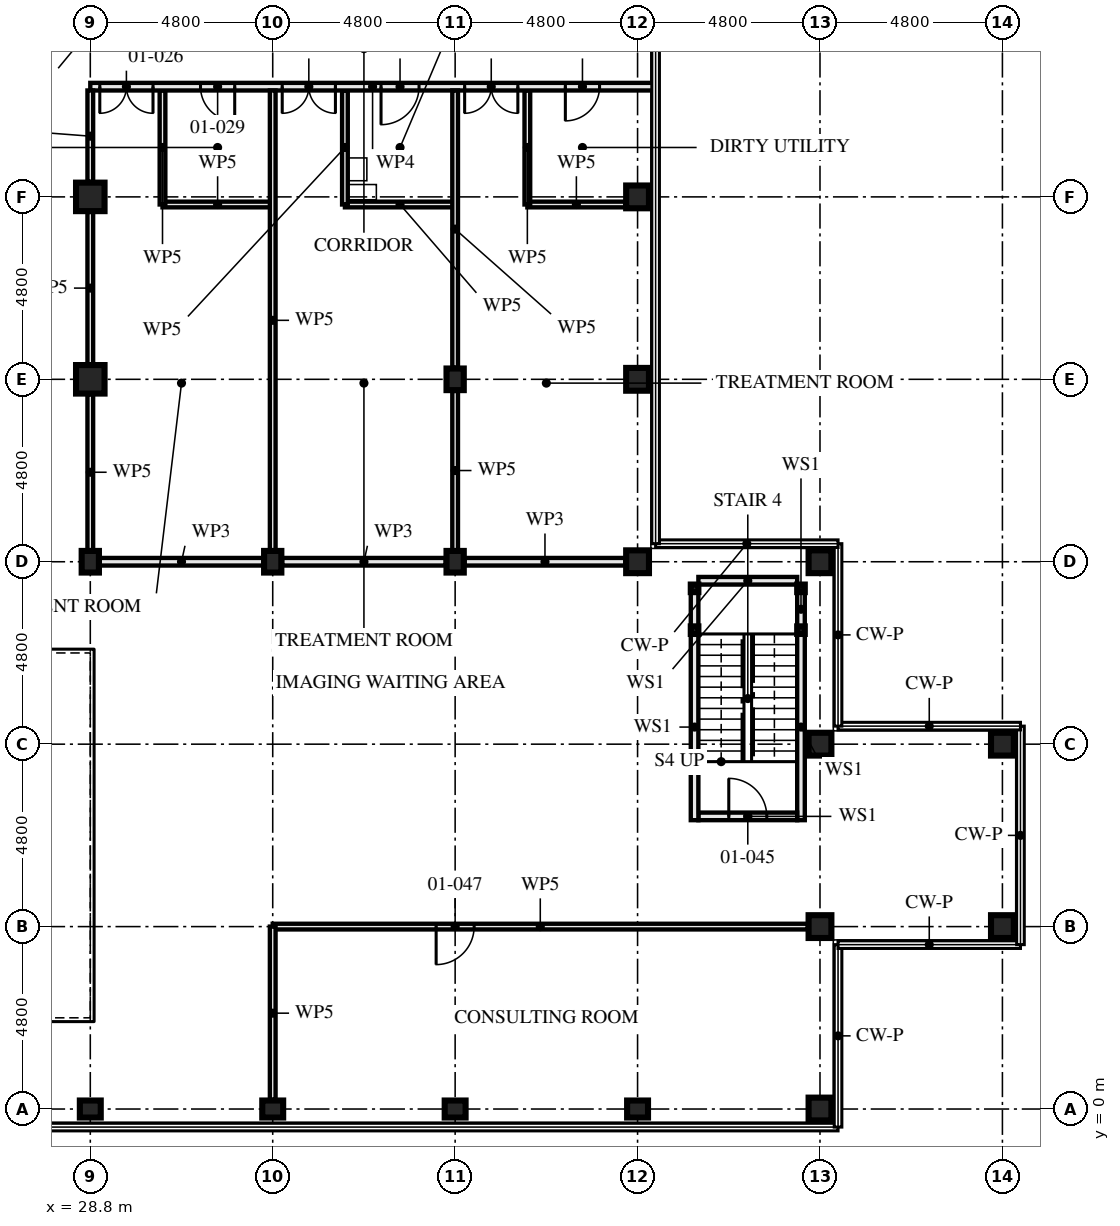
"""IFC4 building model, lengths in metres.
Left out: names, types, materials, properties, quantities, classifications, styles, units other than length and angle.
Written with IfcOpenShell. Run it as: python <this file> out.ifc"""

import sys

from ifc_helpers import new_model, si_unit, direction, frame, frame_2d, origin, origin_2d, place, context, subcontext, project, spatial, rectangle, hollow_rectangle, i_section, extrude, element, fill, save


model = new_model("IFC4")
c1 = context("Model", 3, precision=1e-05, world=origin(), true_north=direction((0.0, 1.0)))
c2 = subcontext(c1, "Body", "Model", "MODEL_VIEW")
j1 = project(units=[si_unit("LENGTHUNIT", "METRE"), si_unit("PLANEANGLEUNIT", "RADIAN")], contexts=[c1])
p1 = place(None, origin())
s1 = spatial("IfcSite", under=j1, at=p1, CompositionType="ELEMENT")
p2 = place(p1, origin())
s2 = spatial("IfcBuilding", under=s1, at=p2, CompositionType="ELEMENT")
p3 = place(p2, frame((0.0, 0.0, 4.5)))
s3 = spatial("IfcBuildingStorey", under=s2, at=p3, CompositionType="ELEMENT", Elevation=4.5)
p4 = place(p3, frame((28.8, 0.0, 0.0), z_axis=(0.0, 0.0, 1.0), x_axis=(0.0, 1.0, 0.0)))
e1 = element("IfcColumn", 1, at=p4, inside=s3, PredefinedType="COLUMN", context=c2, shape_type="SweptSolid", body=[
    extrude(i_section(OverallWidth=0.448, OverallDepth=0.55, WebThickness=0.072, FlangeThickness=0.115, FilletRadius=0.015, at=origin_2d()), origin(), (0.0, 0.0, 1.0), 4.5),
])
p5 = place(p3, frame((28.8, 14.4, 0.0), z_axis=(0.0, 0.0, 1.0), x_axis=(1.0, 0.0, 0.0)))
e2 = element("IfcColumn", 2, at=p5, inside=s3, PredefinedType="COLUMN", context=c2, shape_type="SweptSolid", body=[
    extrude(i_section(OverallWidth=0.454, OverallDepth=0.569, WebThickness=0.078, FlangeThickness=0.125, FilletRadius=0.015, at=origin_2d()), origin(), (0.0, 0.0, 1.0), 4.5),
])
for number, where, z_axis, x_axis in (
    (3, (28.8, 19.2, 0.0), (0.0, 0.0, 1.0), (1.0, 0.0, 0.0)),
    (4, (28.8, 24.0, 0.0), (0.0, 0.0, 1.0), (1.0, 0.0, 0.0)),
):
    element("IfcColumn", number, at=place(p3, frame(where, z_axis=z_axis, x_axis=x_axis)), inside=s3, PredefinedType="COLUMN", context=c2, shape_type="SweptSolid", body=[
        extrude(hollow_rectangle(XDim=0.75, YDim=0.75, WallThickness=0.08, at=origin_2d()), origin(), (0.0, 0.0, 1.0), 4.5),
    ])
p6 = place(p3, frame((33.6, 0.0, 0.0), z_axis=(0.0, 0.0, 1.0), x_axis=(0.0, 1.0, 0.0)))
e5 = element("IfcColumn", 5, at=p6, inside=s3, PredefinedType="COLUMN", context=c2, shape_type="SweptSolid", body=[
    extrude(i_section(OverallWidth=0.448, OverallDepth=0.55, WebThickness=0.072, FlangeThickness=0.115, FilletRadius=0.015, at=origin_2d()), origin(), (0.0, 0.0, 1.0), 4.5),
])
p7 = place(p3, frame((33.6, 14.4, 0.0), z_axis=(0.0, 0.0, 1.0), x_axis=(1.0, 0.0, 0.0)))
e6 = element("IfcColumn", 6, at=p7, inside=s3, PredefinedType="COLUMN", context=c2, shape_type="SweptSolid", body=[
    extrude(i_section(OverallWidth=0.454, OverallDepth=0.569, WebThickness=0.078, FlangeThickness=0.125, FilletRadius=0.015, at=origin_2d()), origin(), (0.0, 0.0, 1.0), 4.5),
])
p8 = place(p3, frame((38.4, 0.0, 0.0), z_axis=(0.0, 0.0, 1.0), x_axis=(0.0, 1.0, 0.0)))
e7 = element("IfcColumn", 7, at=p8, inside=s3, PredefinedType="COLUMN", context=c2, shape_type="SweptSolid", body=[
    extrude(i_section(OverallWidth=0.448, OverallDepth=0.55, WebThickness=0.072, FlangeThickness=0.115, FilletRadius=0.015, at=origin_2d()), origin(), (0.0, 0.0, 1.0), 4.5),
])
for number, where, z_axis, x_axis in (
    (8, (38.4, 14.4, 0.0), (0.0, 0.0, 1.0), (1.0, 0.0, 0.0)),
    (9, (38.4, 19.2, 0.0), (0.0, 0.0, 1.0), (1.0, 0.0, 0.0)),
):
    element("IfcColumn", number, at=place(p3, frame(where, z_axis=z_axis, x_axis=x_axis)), inside=s3, PredefinedType="COLUMN", context=c2, shape_type="SweptSolid", body=[
        extrude(i_section(OverallWidth=0.454, OverallDepth=0.569, WebThickness=0.078, FlangeThickness=0.125, FilletRadius=0.015, at=origin_2d()), origin(), (0.0, 0.0, 1.0), 4.5),
    ])
p9 = place(p3, frame((43.2, 0.0, 0.0), z_axis=(0.0, 0.0, 1.0), x_axis=(0.0, 1.0, 0.0)))
e10 = element("IfcColumn", 10, at=p9, inside=s3, PredefinedType="COLUMN", context=c2, shape_type="SweptSolid", body=[
    extrude(i_section(OverallWidth=0.448, OverallDepth=0.55, WebThickness=0.072, FlangeThickness=0.115, FilletRadius=0.015, at=origin_2d()), origin(), (0.0, 0.0, 1.0), 4.5),
])
p10 = place(p3, frame((43.2, 14.4, 0.0), z_axis=(0.0, 0.0, 1.0), x_axis=(0.0, 1.0, 0.0)))
e11 = element("IfcColumn", 11, at=p10, inside=s3, PredefinedType="COLUMN", context=c2, shape_type="SweptSolid", body=[
    extrude(hollow_rectangle(XDim=0.6, YDim=0.6, WallThickness=0.05, at=origin_2d()), origin(), (0.0, 0.0, 1.0), 4.5),
])
for number, where, z_axis, x_axis in (
    (12, (43.2, 19.2, 0.0), (0.0, 0.0, 1.0), (1.0, 0.0, 0.0)),
    (13, (43.2, 24.0, 0.0), (0.0, 0.0, 1.0), (1.0, 0.0, 0.0)),
):
    element("IfcColumn", number, at=place(p3, frame(where, z_axis=z_axis, x_axis=x_axis)), inside=s3, PredefinedType="COLUMN", context=c2, shape_type="SweptSolid", body=[
        extrude(hollow_rectangle(XDim=0.6, YDim=0.6, WallThickness=0.08, at=origin_2d()), origin(), (0.0, 0.0, 1.0), 4.5),
    ])
for number, where, z_axis, x_axis in (
    (14, (48.0, 0.0, 0.0), (0.0, 0.0, 1.0), (0.0, 1.0, 0.0)),
    (15, (48.0, 4.8, 0.0), (0.0, 0.0, 1.0), (0.0, 1.0, 0.0)),
    (16, (48.0, 9.6, 0.0), (0.0, 0.0, 1.0), (0.0, 1.0, 0.0)),
    (17, (48.0, 14.4, 0.0), (0.0, 0.0, 1.0), (0.0, 1.0, 0.0)),
    (18, (52.8, 4.8, 0.0), (0.0, 0.0, 1.0), (0.0, 1.0, 0.0)),
    (19, (52.8, 9.6, 0.0), (0.0, 0.0, 1.0), (0.0, 1.0, 0.0)),
):
    element("IfcColumn", number, at=place(p3, frame(where, z_axis=z_axis, x_axis=x_axis)), inside=s3, PredefinedType="COLUMN", context=c2, shape_type="SweptSolid", body=[
        extrude(hollow_rectangle(XDim=0.6, YDim=0.6, WallThickness=0.05, at=origin_2d()), origin(), (0.0, 0.0, 1.0), 4.5),
    ])
for number, where, z_axis, x_axis in (
    (20, (44.7, 13.7, 0.0), (0.0, 0.0, 1.0), (1.0, 0.0, 0.0)),
    (21, (47.5, 13.7, 0.0), (0.0, 0.0, 1.0), (1.0, 0.0, 0.0)),
    (22, (44.7, 12.6, 0.0), (0.0, 0.0, 1.0), (1.0, 0.0, 0.0)),
    (23, (47.5, 12.6, 0.0), (0.0, 0.0, 1.0), (1.0, 0.0, 0.0)),
):
    element("IfcColumn", number, at=place(p3, frame(where, z_axis=z_axis, x_axis=x_axis)), inside=s3, PredefinedType="COLUMN", context=c2, shape_type="SweptSolid", body=[
        extrude(hollow_rectangle(XDim=0.2, YDim=0.2, WallThickness=0.008, at=origin_2d()), origin(), (0.0, 0.0, 1.0), 4.33),
    ])
p11 = place(p3, frame((30.7, 23.8, 0.0), z_axis=(0.0, 0.0, 1.0), x_axis=(0.0, 1.0, 0.0)))
e24 = element("IfcWall", 24, at=p11, inside=s3, PredefinedType="PARTITIONING", context=c2, shape_type="SweptSolid", body=[
    extrude(rectangle(XDim=3.0, YDim=0.15, at=frame_2d((1.5, 0.0))), origin(), (0.0, 0.0, 1.0), 3.55),
])
p12 = place(p3, frame((30.7, 23.8, 0.0), z_axis=(0.0, 0.0, 1.0), x_axis=(1.0, 0.0, 0.0)))
e25 = element("IfcWall", 25, at=p12, inside=s3, PredefinedType="PARTITIONING", context=c2, shape_type="SweptSolid", body=[
    extrude(rectangle(XDim=2.9, YDim=0.15, at=frame_2d((1.45, 0.0))), origin(), (0.0, 0.0, 1.0), 4.33),
])
p13 = place(p3, frame((35.5, 23.8, 0.0), z_axis=(0.0, 0.0, 1.0), x_axis=(0.0, 1.0, 0.0)))
e26 = element("IfcWall", 26, at=p13, inside=s3, PredefinedType="PARTITIONING", context=c2, shape_type="SweptSolid", body=[
    extrude(rectangle(XDim=3.0, YDim=0.15, at=frame_2d((1.5, 0.0))), origin(), (0.0, 0.0, 1.0), 3.55),
])
p14 = place(p3, frame((35.5, 23.8, 0.0), z_axis=(0.0, 0.0, 1.0), x_axis=(1.0, 0.0, 0.0)))
e27 = element("IfcWall", 27, at=p14, inside=s3, PredefinedType="PARTITIONING", context=c2, shape_type="SweptSolid", body=[
    extrude(rectangle(XDim=2.9, YDim=0.15, at=frame_2d((1.45, 0.0))), origin(), (0.0, 0.0, 1.0), 4.33),
])
p15 = place(p3, frame((40.3, 23.8, 0.0), z_axis=(0.0, 0.0, 1.0), x_axis=(0.0, 1.0, 0.0)))
e28 = element("IfcWall", 28, at=p15, inside=s3, PredefinedType="PARTITIONING", context=c2, shape_type="SweptSolid", body=[
    extrude(rectangle(XDim=3.0, YDim=0.15, at=frame_2d((1.5, 0.0))), origin(), (0.0, 0.0, 1.0), 3.55),
])
p16 = place(p3, frame((40.3, 23.8, 0.0), z_axis=(0.0, 0.0, 1.0), x_axis=(1.0, 0.0, 0.0)))
e29 = element("IfcWall", 29, at=p16, inside=s3, PredefinedType="PARTITIONING", context=c2, shape_type="SweptSolid", body=[
    extrude(rectangle(XDim=2.58, YDim=0.15, at=frame_2d((1.29, 0.0))), origin(), (0.0, 0.0, 1.0), 4.33),
])
p17 = place(p3, frame((33.6, 14.705, 0.0), z_axis=(0.0, 0.0, 1.0), x_axis=(0.0, 1.0, 0.0)))
e30 = element("IfcWall", 30, at=p17, inside=s3, PredefinedType="PARTITIONING", context=c2, shape_type="SweptSolid", body=[
    extrude(rectangle(XDim=12.095, YDim=0.15, at=frame_2d((6.048, 0.0))), origin(), (0.0, 0.0, 1.0), 3.55),
])
p18 = place(p3, frame((38.4, 14.705, 0.0), z_axis=(0.0, 0.0, 1.0), x_axis=(0.0, 1.0, 0.0)))
e31 = element("IfcWall", 31, at=p18, inside=s3, PredefinedType="PARTITIONING", context=c2, shape_type="SweptSolid", body=[
    extrude(rectangle(XDim=4.191, YDim=0.15, at=frame_2d((2.095, 0.0))), origin(), (0.0, 0.0, 1.0), 3.55),
])
p19 = place(p3, frame((38.4, 19.504, 0.0), z_axis=(0.0, 0.0, 1.0), x_axis=(0.0, 1.0, 0.0)))
e32 = element("IfcWall", 32, at=p19, inside=s3, PredefinedType="PARTITIONING", context=c2, shape_type="SweptSolid", body=[
    extrude(rectangle(XDim=7.296, YDim=0.15, at=frame_2d((3.648, 0.0))), origin(), (0.0, 0.0, 1.0), 3.55),
])
p20 = place(p3, frame((28.8, 26.9, 0.0), z_axis=(0.0, 0.0, 1.0), x_axis=(1.0, 0.0, 0.0)))
e33 = element("IfcWall", 33, at=p20, inside=s3, PredefinedType="PARTITIONING", context=c2, shape_type="SweptSolid", body=[
    extrude(rectangle(XDim=14.855, YDim=0.2, at=frame_2d((7.427, 0.0))), origin(), (0.0, 0.0, 1.0), 3.32),
])
p21 = place(p20, frame((0.25, 0.0, 0.0)))
e34 = element("IfcOpeningElement", 34, at=p21, cuts=e33, PredefinedType="OPENING", context=c2, shape_type="SweptSolid", body=[
    extrude(rectangle(XDim=1.4, YDim=2.4, at=frame_2d((0.7, 1.2))), frame((0.0, 0.111, 0.0), z_axis=(0.0, -1.0, 0.0), x_axis=(1.0, 0.0, 0.0)), (0.0, 0.0, 1.0), 0.221),
])
p22 = place(p20, frame((5.05, 0.0, 0.0)))
e35 = element("IfcOpeningElement", 35, at=p22, cuts=e33, PredefinedType="OPENING", context=c2, shape_type="SweptSolid", body=[
    extrude(rectangle(XDim=1.4, YDim=2.4, at=frame_2d((0.7, 1.2))), frame((0.0, 0.111, 0.0), z_axis=(0.0, -1.0, 0.0), x_axis=(1.0, 0.0, 0.0)), (0.0, 0.0, 1.0), 0.221),
])
p23 = place(p20, frame((9.85, 0.0, 0.0)))
e36 = element("IfcOpeningElement", 36, at=p23, cuts=e33, PredefinedType="OPENING", context=c2, shape_type="SweptSolid", body=[
    extrude(rectangle(XDim=1.4, YDim=2.4, at=frame_2d((0.7, 1.2))), frame((0.0, 0.111, 0.0), z_axis=(0.0, -1.0, 0.0), x_axis=(1.0, 0.0, 0.0)), (0.0, 0.0, 1.0), 0.221),
])
p24 = place(p20, frame((2.9, 0.0, 0.0)))
e37 = element("IfcOpeningElement", 37, at=p24, cuts=e33, PredefinedType="OPENING", context=c2, shape_type="SweptSolid", body=[
    extrude(rectangle(XDim=0.9, YDim=2.1, at=frame_2d((0.45, 1.05))), frame((0.0, 0.111, 0.0), z_axis=(0.0, -1.0, 0.0), x_axis=(1.0, 0.0, 0.0)), (0.0, 0.0, 1.0), 0.221),
])
p25 = place(p20, frame((7.65, 0.0, 0.0)))
e38 = element("IfcOpeningElement", 38, at=p25, cuts=e33, PredefinedType="OPENING", context=c2, shape_type="SweptSolid", body=[
    extrude(rectangle(XDim=1.0, YDim=2.1, at=frame_2d((0.5, 1.05))), frame((0.0, 0.111, 0.0), z_axis=(0.0, -1.0, 0.0), x_axis=(1.0, 0.0, 0.0)), (0.0, 0.0, 1.0), 0.221),
])
p26 = place(p20, frame((12.5, 0.0, 0.0)))
e39 = element("IfcOpeningElement", 39, at=p26, cuts=e33, PredefinedType="OPENING", context=c2, shape_type="SweptSolid", body=[
    extrude(rectangle(XDim=0.9, YDim=2.1, at=frame_2d((0.45, 1.05))), frame((0.0, 0.111, 0.0), z_axis=(0.0, -1.0, 0.0), x_axis=(1.0, 0.0, 0.0)), (0.0, 0.0, 1.0), 0.221),
])
p27 = place(p3, frame((44.7, 13.6, 0.0), z_axis=(0.0, 0.0, 1.0), x_axis=(0.0, -1.0, 0.0)))
e40 = element("IfcWall", 40, at=p27, inside=s3, PredefinedType="SOLIDWALL", context=c2, shape_type="SweptSolid", body=[
    extrude(rectangle(XDim=0.9, YDim=0.2, at=frame_2d((0.45, 0.0))), origin(), (0.0, 0.0, 1.0), 3.99),
])
p28 = place(p3, frame((44.7, 12.5, 0.0), z_axis=(0.0, 0.0, 1.0), x_axis=(0.0, -1.0, 0.0)))
e41 = element("IfcWall", 41, at=p28, inside=s3, PredefinedType="SOLIDWALL", context=c2, shape_type="SweptSolid", body=[
    extrude(rectangle(XDim=4.9, YDim=0.2, at=frame_2d((2.45, 0.0))), origin(), (0.0, 0.0, 1.0), 3.99),
])
p29 = place(p3, frame((47.5, 13.6, 0.0), z_axis=(0.0, 0.0, 1.0), x_axis=(0.0, -1.0, 0.0)))
e42 = element("IfcWall", 42, at=p29, inside=s3, PredefinedType="SOLIDWALL", context=c2, shape_type="SweptSolid", body=[
    extrude(rectangle(XDim=0.9, YDim=0.2, at=frame_2d((0.45, 0.0))), origin(), (0.0, 0.0, 1.0), 3.99),
])
p30 = place(p3, frame((47.5, 12.5, 0.0), z_axis=(0.0, 0.0, 1.0), x_axis=(0.0, -1.0, 0.0)))
e43 = element("IfcWall", 43, at=p30, inside=s3, PredefinedType="SOLIDWALL", context=c2, shape_type="SweptSolid", body=[
    extrude(rectangle(XDim=4.9, YDim=0.2, at=frame_2d((2.45, 0.0))), origin(), (0.0, 0.0, 1.0), 3.99),
])
p31 = place(p3, frame((44.8, 13.9, 0.0), z_axis=(0.0, 0.0, 1.0), x_axis=(1.0, 0.0, 0.0)))
e44 = element("IfcWall", 44, at=p31, inside=s3, PredefinedType="SOLIDWALL", context=c2, shape_type="SweptSolid", body=[
    extrude(rectangle(XDim=2.6, YDim=0.2, at=frame_2d((1.3, 0.0))), origin(), (0.0, 0.0, 1.0), 4.33),
])
p32 = place(p3, frame((44.8, 7.7, 0.0), z_axis=(0.0, 0.0, 1.0), x_axis=(1.0, 0.0, 0.0)))
e45 = element("IfcWall", 45, at=p32, inside=s3, PredefinedType="SOLIDWALL", context=c2, shape_type="SweptSolid", body=[
    extrude(rectangle(XDim=2.6, YDim=0.2, at=frame_2d((1.3, 0.0))), origin(), (0.0, 0.0, 1.0), 4.33),
])
p33 = place(p32, frame((0.8, 0.0, 0.0)))
e46 = element("IfcOpeningElement", 46, at=p33, cuts=e45, PredefinedType="OPENING", context=c2, shape_type="SweptSolid", body=[
    extrude(rectangle(XDim=1.0, YDim=2.1, at=frame_2d((0.5, 1.05))), frame((0.0, 0.111, 0.0), z_axis=(0.0, -1.0, 0.0), x_axis=(1.0, 0.0, 0.0)), (0.0, 0.0, 1.0), 0.221),
])
p34 = place(p3, frame((33.6, 4.8, 0.0), z_axis=(0.0, 0.0, 1.0), x_axis=(1.0, 0.0, 0.0)))
e47 = element("IfcWall", 47, at=p34, inside=s3, PredefinedType="PARTITIONING", context=c2, shape_type="SweptSolid", body=[
    extrude(rectangle(XDim=14.08, YDim=0.15, at=frame_2d((7.04, 0.0))), origin(), (0.0, 0.0, 1.0), 3.55),
])
p35 = place(p34, frame((4.3, 0.0, 0.0)))
e48 = element("IfcOpeningElement", 48, at=p35, cuts=e47, PredefinedType="OPENING", context=c2, shape_type="SweptSolid", body=[
    extrude(rectangle(XDim=1.0, YDim=2.4, at=frame_2d((0.5, 1.2))), frame((0.0, 0.085, 0.0), z_axis=(0.0, -1.0, 0.0), x_axis=(1.0, 0.0, 0.0)), (0.0, 0.0, 1.0), 0.171),
])
p36 = place(p3, frame((33.6, 0.244, 0.0), z_axis=(0.0, 0.0, 1.0), x_axis=(0.0, 1.0, 0.0)))
e49 = element("IfcWall", 49, at=p36, inside=s3, PredefinedType="PARTITIONING", context=c2, shape_type="SweptSolid", body=[
    extrude(rectangle(XDim=4.556, YDim=0.15, at=frame_2d((2.278, 0.0))), origin(), (0.0, 0.0, 1.0), 3.55),
])
p37 = place(p3, frame((29.047, 14.4, 0.0), z_axis=(0.0, 0.0, 1.0), x_axis=(1.0, 0.0, 0.0)))
e50 = element("IfcWall", 50, at=p37, inside=s3, PredefinedType="PARTITIONING", context=c2, shape_type="SweptSolid", body=[
    extrude(rectangle(XDim=4.306, YDim=0.2, at=frame_2d((2.153, 0.0))), origin(), (0.0, 0.0, 1.0), 3.32),
])
p38 = place(p3, frame((33.847, 14.4, 0.0), z_axis=(0.0, 0.0, 1.0), x_axis=(1.0, 0.0, 0.0)))
e51 = element("IfcWall", 51, at=p38, inside=s3, PredefinedType="PARTITIONING", context=c2, shape_type="SweptSolid", body=[
    extrude(rectangle(XDim=4.306, YDim=0.2, at=frame_2d((2.153, 0.0))), origin(), (0.0, 0.0, 1.0), 3.32),
])
p39 = place(p3, frame((38.647, 14.4, 0.0), z_axis=(0.0, 0.0, 1.0), x_axis=(1.0, 0.0, 0.0)))
e52 = element("IfcWall", 52, at=p39, inside=s3, PredefinedType="PARTITIONING", context=c2, shape_type="SweptSolid", body=[
    extrude(rectangle(XDim=4.233, YDim=0.2, at=frame_2d((2.116, 0.0))), origin(), (0.0, 0.0, 1.0), 3.32),
])
p40 = place(p3, frame((28.8, 14.705, 0.0), z_axis=(0.0, 0.0, 1.0), x_axis=(0.0, 1.0, 0.0)))
e53 = element("IfcWall", 53, at=p40, inside=s3, PredefinedType="PARTITIONING", context=c2, shape_type="SweptSolid", body=[
    extrude(rectangle(XDim=4.1, YDim=0.15, at=frame_2d((2.05, 0.0))), origin(), (0.0, 0.0, 1.0), 3.32),
])
p41 = place(p3, frame((28.8, 19.595, 0.0), z_axis=(0.0, 0.0, 1.0), x_axis=(0.0, 1.0, 0.0)))
e54 = element("IfcWall", 54, at=p41, inside=s3, PredefinedType="PARTITIONING", context=c2, shape_type="SweptSolid", body=[
    extrude(rectangle(XDim=4.01, YDim=0.15, at=frame_2d((2.005, 0.0))), origin(), (0.0, 0.0, 1.0), 3.32),
])
p42 = place(p3, frame((28.8, 24.395, 0.0), z_axis=(0.0, 0.0, 1.0), x_axis=(0.0, 1.0, 0.0)))
e55 = element("IfcWall", 55, at=p42, inside=s3, PredefinedType="PARTITIONING", context=c2, shape_type="SweptSolid", body=[
    extrude(rectangle(XDim=2.405, YDim=0.15, at=frame_2d((1.203, 0.0))), origin(), (0.0, 0.0, 1.0), 3.32),
])
p43 = place(p21, frame((1.4, 0.0, 0.0), z_axis=(0.0, 0.0, 1.0), x_axis=(-1.0, 0.0, 0.0)))
e56 = element("IfcDoor", 56, at=p43, inside=s3, OperationType="DOUBLE_DOOR_SINGLE_SWING", PredefinedType="DOOR", context=c2, shape_type="SweptSolid", body=[
    extrude(rectangle(XDim=1.4, YDim=2.4, at=frame_2d((0.7, 1.2))), frame((0.0, 0.027, 0.0), z_axis=(0.0, -1.0, 0.0), x_axis=(1.0, 0.0, 0.0)), (0.0, 0.0, 1.0), 0.054),
])
fill(e34, e56)
p44 = place(p22, frame((1.4, 0.0, 0.0), z_axis=(0.0, 0.0, 1.0), x_axis=(-1.0, 0.0, 0.0)))
e57 = element("IfcDoor", 57, at=p44, inside=s3, OperationType="DOUBLE_DOOR_SINGLE_SWING", PredefinedType="DOOR", context=c2, shape_type="SweptSolid", body=[
    extrude(rectangle(XDim=1.4, YDim=2.4, at=frame_2d((0.7, 1.2))), frame((0.0, 0.027, 0.0), z_axis=(0.0, -1.0, 0.0), x_axis=(1.0, 0.0, 0.0)), (0.0, 0.0, 1.0), 0.054),
])
fill(e35, e57)
p45 = place(p23, frame((1.4, 0.0, 0.0), z_axis=(0.0, 0.0, 1.0), x_axis=(-1.0, 0.0, 0.0)))
e58 = element("IfcDoor", 58, at=p45, inside=s3, OperationType="DOUBLE_DOOR_SINGLE_SWING", PredefinedType="DOOR", context=c2, shape_type="SweptSolid", body=[
    extrude(rectangle(XDim=1.4, YDim=2.4, at=frame_2d((0.7, 1.2))), frame((0.0, 0.027, 0.0), z_axis=(0.0, -1.0, 0.0), x_axis=(1.0, 0.0, 0.0)), (0.0, 0.0, 1.0), 0.054),
])
fill(e36, e58)
p46 = place(p24, frame((0.9, 0.0, 0.0), z_axis=(0.0, 0.0, 1.0), x_axis=(-1.0, 0.0, 0.0)))
e59 = element("IfcDoor", 59, at=p46, inside=s3, OperationType="SINGLE_SWING_RIGHT", PredefinedType="DOOR", context=c2, shape_type="SweptSolid", body=[
    extrude(rectangle(XDim=0.9, YDim=2.1, at=frame_2d((0.45, 1.05))), frame((0.0, 0.027, 0.0), z_axis=(0.0, -1.0, 0.0), x_axis=(1.0, 0.0, 0.0)), (0.0, 0.0, 1.0), 0.054),
])
fill(e37, e59)
p47 = place(p25, frame((1.0, 0.0, 0.0), z_axis=(0.0, 0.0, 1.0), x_axis=(-1.0, 0.0, 0.0)))
e60 = element("IfcDoor", 60, at=p47, inside=s3, OperationType="SINGLE_SWING_LEFT", PredefinedType="DOOR", context=c2, shape_type="SweptSolid", body=[
    extrude(rectangle(XDim=1.0, YDim=2.1, at=frame_2d((0.5, 1.05))), frame((0.0, 0.027, 0.0), z_axis=(0.0, -1.0, 0.0), x_axis=(1.0, 0.0, 0.0)), (0.0, 0.0, 1.0), 0.054),
])
fill(e38, e60)
p48 = place(p26, frame((0.9, 0.0, 0.0), z_axis=(0.0, 0.0, 1.0), x_axis=(-1.0, 0.0, 0.0)))
e61 = element("IfcDoor", 61, at=p48, inside=s3, OperationType="SINGLE_SWING_LEFT", PredefinedType="DOOR", context=c2, shape_type="SweptSolid", body=[
    extrude(rectangle(XDim=0.9, YDim=2.1, at=frame_2d((0.45, 1.05))), frame((0.0, 0.027, 0.0), z_axis=(0.0, -1.0, 0.0), x_axis=(1.0, 0.0, 0.0)), (0.0, 0.0, 1.0), 0.054),
])
fill(e39, e61)
p49 = place(p33, origin())
e62 = element("IfcDoor", 62, at=p49, inside=s3, OperationType="SINGLE_SWING_RIGHT", PredefinedType="DOOR", context=c2, shape_type="SweptSolid", body=[
    extrude(rectangle(XDim=1.0, YDim=2.1, at=frame_2d((0.5, 1.05))), frame((0.0, 0.032, 0.0), z_axis=(0.0, -1.0, 0.0), x_axis=(1.0, 0.0, 0.0)), (0.0, 0.0, 1.0), 0.064),
])
fill(e46, e62)
p50 = place(p35, frame((1.0, 0.0, 0.0), z_axis=(0.0, 0.0, 1.0), x_axis=(-1.0, 0.0, 0.0)))
e63 = element("IfcDoor", 63, at=p50, inside=s3, OperationType="SINGLE_SWING_LEFT", PredefinedType="DOOR", context=c2, shape_type="SweptSolid", body=[
    extrude(rectangle(XDim=1.0, YDim=2.4, at=frame_2d((0.5, 1.2))), frame((0.0, 0.027, 0.0), z_axis=(0.0, -1.0, 0.0), x_axis=(1.0, 0.0, 0.0)), (0.0, 0.0, 1.0), 0.054),
])
fill(e48, e63)
save(model, sys.argv[1])
